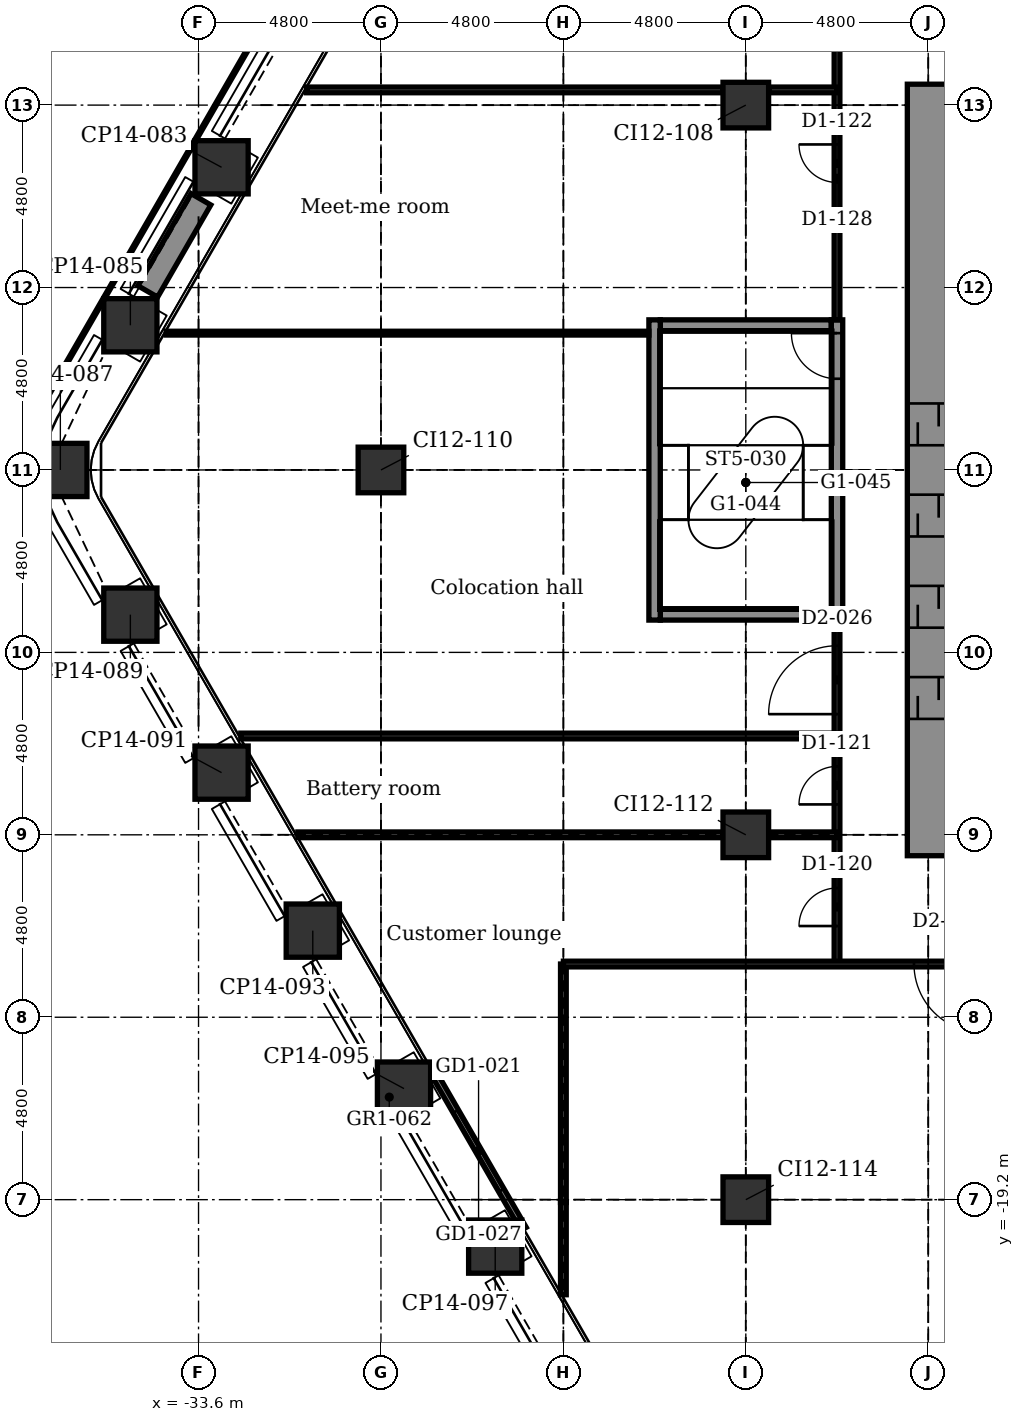
"""IFC4 building model, lengths in metres.
Left out: names, types, materials, properties, quantities, classifications, styles, units other than length and angle.
Written with IfcOpenShell. Run it as: python <this file> out.ifc"""

import sys

from ifc_helpers import new_model, si_unit, direction, frame, frame_2d, origin, origin_2d, place, context, subcontext, project, spatial, rectangle, extrude, element, fill, save


model = new_model("IFC4")
c1 = context("Model", 3, precision=1e-05, world=origin(), true_north=direction((0.0, 1.0)))
c2 = subcontext(c1, "Body", "Model", "MODEL_VIEW")
j1 = project(units=[si_unit("LENGTHUNIT", "METRE"), si_unit("PLANEANGLEUNIT", "RADIAN")], contexts=[c1])
p1 = place(None, origin())
s1 = spatial("IfcSite", under=j1, at=p1, CompositionType="ELEMENT")
p2 = place(p1, origin())
s2 = spatial("IfcBuilding", under=s1, at=p2, CompositionType="ELEMENT")
p3 = place(p2, frame((0.0, 0.0, 44.4)))
s3 = spatial("IfcBuildingStorey", under=s2, at=p3, CompositionType="ELEMENT", Elevation=44.4)
for number, where, z_axis, x_axis in (
    (1, (-25.794, -20.435, -0.25), (0.0, 0.0, 1.0), (0.866, 0.5, 0.0)),
    (2, (-28.194, -16.278, -0.25), (0.0, 0.0, 1.0), (0.866, 0.5, 0.0)),
    (3, (-30.594, -12.121, -0.25), (0.0, 0.0, 1.0), (0.866, 0.5, 0.0)),
    (4, (-32.994, -7.964, -0.25), (0.0, 0.0, 1.0), (0.866, 0.5, 0.0)),
    (5, (-35.394, -3.807, -0.25), (0.0, 0.0, 1.0), (0.866, 0.5, 0.0)),
    (6, (-37.236, 0.0, -0.25), (0.0, 0.0, 1.0), (1.0, 0.0, 0.0)),
    (7, (-35.394, 3.807, -0.25), (0.0, 0.0, 1.0), (0.5, 0.866, 0.0)),
    (8, (-32.994, 7.964, -0.25), (0.0, 0.0, 1.0), (0.5, 0.866, 0.0)),
):
    element("IfcColumn", number, at=place(p3, frame(where, z_axis=z_axis, x_axis=x_axis)), inside=s3, PredefinedType="COLUMN", context=c2, shape_type="SweptSolid", body=[
        extrude(rectangle(XDim=1.4, YDim=1.4, at=origin_2d()), origin(), (0.0, 0.0, 1.0), 5.5),
    ])
for number, where, z_axis, x_axis in (
    (9, (-28.8, 0.0, -0.25), (0.0, 0.0, 1.0), (1.0, 0.0, 0.0)),
    (10, (-19.2, -19.2, -0.25), (0.0, 0.0, 1.0), (1.0, 0.0, 0.0)),
    (11, (-19.2, -9.6, -0.25), (0.0, 0.0, 1.0), (1.0, 0.0, 0.0)),
    (12, (-19.2, 9.6, -0.25), (0.0, 0.0, 1.0), (1.0, 0.0, 0.0)),
):
    element("IfcColumn", number, at=place(p3, frame(where, z_axis=z_axis, x_axis=x_axis)), inside=s3, PredefinedType="COLUMN", context=c2, shape_type="SweptSolid", body=[
        extrude(rectangle(XDim=1.2, YDim=1.2, at=origin_2d()), origin(), (0.0, 0.0, 1.0), 5.5),
    ])
for number, where, z_axis, x_axis in (
    (13, (-21.45, -3.8, -0.25), (0.0, 0.0, 1.0), (1.0, 0.0, 0.0)),
    (14, (-21.45, 3.8, -0.25), (0.0, 0.0, 1.0), (1.0, 0.0, 0.0)),
):
    element("IfcWall", number, at=place(p3, frame(where, z_axis=z_axis, x_axis=x_axis)), inside=s3, PredefinedType="STANDARD", context=c2, shape_type="SweptSolid", body=[
        extrude(rectangle(XDim=4.5, YDim=0.3, at=frame_2d((2.25, 0.0))), origin(), (0.0, 0.0, 1.0), 5.5),
    ])
p4 = place(p3, frame((-21.6, -3.95, -0.25), z_axis=(0.0, 0.0, 1.0), x_axis=(0.0, 1.0, 0.0)))
e15 = element("IfcWall", 15, at=p4, inside=s3, PredefinedType="STANDARD", context=c2, shape_type="SweptSolid", body=[
    extrude(rectangle(XDim=7.9, YDim=0.3, at=frame_2d((3.95, 0.0))), origin(), (0.0, 0.0, 1.0), 5.5),
])
p5 = place(p3, frame((-16.8, -3.95, -0.25), z_axis=(0.0, 0.0, 1.0), x_axis=(0.0, 1.0, 0.0)))
e16 = element("IfcWall", 16, at=p5, inside=s3, PredefinedType="STANDARD", context=c2, shape_type="SweptSolid", body=[
    extrude(rectangle(XDim=7.9, YDim=0.3, at=frame_2d((3.95, 0.0))), origin(), (0.0, 0.0, 1.0), 5.5),
])
p6 = place(p5, frame((6.35, 0.0, 0.25)))
e17 = element("IfcOpeningElement", 17, at=p6, cuts=e16, PredefinedType="OPENING", context=c2, shape_type="SweptSolid", body=[
    extrude(rectangle(XDim=1.2, YDim=2.1, at=frame_2d((0.6, 1.05))), frame((0.0, 0.16, 0.0), z_axis=(0.0, -1.0, 0.0), x_axis=(1.0, 0.0, 0.0)), (0.0, 0.0, 1.0), 0.32),
])
p7 = place(p3, frame((-14.4, -10.15, -0.25), z_axis=(0.0, 0.0, 1.0), x_axis=(0.0, 1.0, 0.0)))
e18 = element("IfcWall", 18, at=p7, inside=s3, PredefinedType="SHEAR", context=c2, shape_type="SweptSolid", body=[
    extrude(rectangle(XDim=20.3, YDim=1.1, at=frame_2d((10.15, 0.0))), origin(), (0.0, 0.0, 1.0), 5.5),
])
p8 = place(p7, frame((3.6, 0.0, 0.25)))
e19 = element("IfcOpeningElement", 19, at=p8, cuts=e18, PredefinedType="OPENING", context=c2, shape_type="SweptSolid", body=[
    extrude(rectangle(XDim=1.1, YDim=2.1, at=frame_2d((0.55, 1.05))), frame((0.0, 0.56, 0.0), z_axis=(0.0, -1.0, 0.0), x_axis=(1.0, 0.0, 0.0)), (0.0, 0.0, 1.0), 1.12),
])
p9 = place(p7, frame((6.0, 0.0, 0.25)))
e20 = element("IfcOpeningElement", 20, at=p9, cuts=e18, PredefinedType="OPENING", context=c2, shape_type="SweptSolid", body=[
    extrude(rectangle(XDim=1.1, YDim=2.1, at=frame_2d((0.55, 1.05))), frame((0.0, 0.56, 0.0), z_axis=(0.0, -1.0, 0.0), x_axis=(1.0, 0.0, 0.0)), (0.0, 0.0, 1.0), 1.12),
])
p10 = place(p7, frame((8.4, 0.0, 0.25)))
e21 = element("IfcOpeningElement", 21, at=p10, cuts=e18, PredefinedType="OPENING", context=c2, shape_type="SweptSolid", body=[
    extrude(rectangle(XDim=1.1, YDim=2.1, at=frame_2d((0.55, 1.05))), frame((0.0, 0.56, 0.0), z_axis=(0.0, -1.0, 0.0), x_axis=(1.0, 0.0, 0.0)), (0.0, 0.0, 1.0), 1.12),
])
p11 = place(p7, frame((10.8, 0.0, 0.25)))
e22 = element("IfcOpeningElement", 22, at=p11, cuts=e18, PredefinedType="OPENING", context=c2, shape_type="SweptSolid", body=[
    extrude(rectangle(XDim=1.1, YDim=2.1, at=frame_2d((0.55, 1.05))), frame((0.0, 0.56, 0.0), z_axis=(0.0, -1.0, 0.0), x_axis=(1.0, 0.0, 0.0)), (0.0, 0.0, 1.0), 1.12),
])
p12 = place(p3, frame((-25.047, -19.969, 0.0), z_axis=(0.0, 0.0, 1.0), x_axis=(-0.5000167099, 0.866015756104, 0.0)))
e23 = element("IfcWall", 23, at=p12, inside=s3, PredefinedType="PARTITIONING", context=c2, shape_type="SweptSolid", body=[
    extrude(rectangle(XDim=4.74, YDim=0.16, at=frame_2d((2.37, 0.0))), origin(), (0.0, 0.0, 1.0), 5.25),
])
p13 = place(p12, frame((1.17, 0.0, 0.0)))
e24 = element("IfcOpeningElement", 24, at=p13, cuts=e23, PredefinedType="OPENING", context=c2, shape_type="SweptSolid", body=[
    extrude(rectangle(XDim=2.4, YDim=2.4, at=frame_2d((1.2, 1.2))), frame((0.0, 0.09, 0.0), z_axis=(0.0, -1.0, 0.0), x_axis=(1.0, 0.0, 0.0)), (0.0, 0.0, 1.0), 0.18),
])
p14 = place(p3, frame((-34.937, 4.698, 0.0), z_axis=(0.0, 0.0, 1.0), x_axis=(0.49998411664, 0.866034573852, 0.0)))
e25 = element("IfcWall", 25, at=p14, inside=s3, PredefinedType="USERDEFINED", context=c2, shape_type="SweptSolid", body=[
    extrude(rectangle(XDim=2.8, YDim=0.6, at=frame_2d((1.4, 0.0))), origin(), (0.0, 0.0, 1.0), 0.7),
])
p15 = place(p3, frame((-16.8, -13.0, 0.0), z_axis=(0.0, 0.0, 1.0), x_axis=(0.0, 1.0, 0.0)))
e26 = element("IfcWall", 26, at=p15, inside=s3, PredefinedType="PARTITIONING", context=c2, shape_type="SweptSolid", body=[
    extrude(rectangle(XDim=9.05, YDim=0.15, at=frame_2d((4.525, 0.0))), origin(), (0.0, 0.0, 1.0), 5.25),
])
p16 = place(p15, frame((1.0, 0.0, 0.0)))
e27 = element("IfcOpeningElement", 27, at=p16, cuts=e26, PredefinedType="OPENING", context=c2, shape_type="SweptSolid", body=[
    extrude(rectangle(XDim=1.0, YDim=2.1, at=frame_2d((0.5, 1.05))), frame((0.0, 0.085, 0.0), z_axis=(0.0, -1.0, 0.0), x_axis=(1.0, 0.0, 0.0)), (0.0, 0.0, 1.0), 0.17),
])
p17 = place(p15, frame((4.2, 0.0, 0.0)))
e28 = element("IfcOpeningElement", 28, at=p17, cuts=e26, PredefinedType="OPENING", context=c2, shape_type="SweptSolid", body=[
    extrude(rectangle(XDim=1.0, YDim=2.1, at=frame_2d((0.5, 1.05))), frame((0.0, 0.085, 0.0), z_axis=(0.0, -1.0, 0.0), x_axis=(1.0, 0.0, 0.0)), (0.0, 0.0, 1.0), 0.17),
])
p18 = place(p15, frame((6.575, 0.0, 0.0)))
e29 = element("IfcOpeningElement", 29, at=p18, cuts=e26, PredefinedType="OPENING", context=c2, shape_type="SweptSolid", body=[
    extrude(rectangle(XDim=1.8, YDim=2.1, at=frame_2d((0.9, 1.05))), frame((0.0, 0.085, 0.0), z_axis=(0.0, -1.0, 0.0), x_axis=(1.0, 0.0, 0.0)), (0.0, 0.0, 1.0), 0.17),
])
p19 = place(p3, frame((-16.8, 3.95, 0.0), z_axis=(0.0, 0.0, 1.0), x_axis=(0.0, 1.0, 0.0)))
e30 = element("IfcWall", 30, at=p19, inside=s3, PredefinedType="PARTITIONING", context=c2, shape_type="SweptSolid", body=[
    extrude(rectangle(XDim=9.35, YDim=0.15, at=frame_2d((4.675, 0.0))), origin(), (0.0, 0.0, 1.0), 5.25),
])
p20 = place(p19, frame((3.615, 0.0, 0.0)))
e31 = element("IfcOpeningElement", 31, at=p20, cuts=e30, PredefinedType="OPENING", context=c2, shape_type="SweptSolid", body=[
    extrude(rectangle(XDim=1.0, YDim=2.1, at=frame_2d((0.5, 1.05))), frame((0.0, 0.085, 0.0), z_axis=(0.0, -1.0, 0.0), x_axis=(1.0, 0.0, 0.0)), (0.0, 0.0, 1.0), 0.17),
])
p21 = place(p19, frame((7.2, 0.0, 0.0)))
e32 = element("IfcOpeningElement", 32, at=p21, cuts=e30, PredefinedType="OPENING", context=c2, shape_type="SweptSolid", body=[
    extrude(rectangle(XDim=1.0, YDim=2.1, at=frame_2d((0.5, 1.05))), frame((0.0, 0.085, 0.0), z_axis=(0.0, -1.0, 0.0), x_axis=(1.0, 0.0, 0.0)), (0.0, 0.0, 1.0), 0.17),
])
p22 = place(p3, frame((-24.0, -19.274, 0.0), z_axis=(0.0, 0.0, 1.0), x_axis=(0.0, 1.0, 0.0)))
e33 = element("IfcWall", 33, at=p22, inside=s3, PredefinedType="PARTITIONING", context=c2, shape_type="SweptSolid", body=[
    extrude(rectangle(XDim=6.274, YDim=0.15, at=frame_2d((3.137, 0.0))), origin(), (0.0, 0.0, 1.0), 4.717),
])
p23 = place(p3, frame((-24.0, -21.701, 0.0), z_axis=(0.0, 0.0, 1.0), x_axis=(0.0, 1.0, 0.0)))
e34 = element("IfcWall", 34, at=p23, inside=s3, PredefinedType="PARTITIONING", context=c2, shape_type="SweptSolid", body=[
    extrude(rectangle(XDim=2.427, YDim=0.15, at=frame_2d((1.214, 0.0))), origin(), (0.0, 0.0, 1.0), 4.94),
])
p24 = place(p3, frame((-24.0, -13.0, 0.0), z_axis=(0.0, 0.0, 1.0), x_axis=(1.0, 0.0, 0.0)))
e35 = element("IfcWall", 35, at=p24, inside=s3, PredefinedType="PARTITIONING", context=c2, shape_type="SweptSolid", body=[
    extrude(rectangle(XDim=40.8, YDim=0.15, at=frame_2d((20.4, 0.0))), origin(), (0.0, 0.0, 1.0), 5.25),
])
p25 = place(p24, frame((9.225, 0.0, 0.0)))
e36 = element("IfcOpeningElement", 36, at=p25, cuts=e35, PredefinedType="OPENING", context=c2, shape_type="SweptSolid", body=[
    extrude(rectangle(XDim=1.8, YDim=2.1, at=frame_2d((0.9, 1.05))), frame((0.0, 0.085, 0.0), z_axis=(0.0, -1.0, 0.0), x_axis=(1.0, 0.0, 0.0)), (0.0, 0.0, 1.0), 0.17),
])
p26 = place(p24, frame((12.7, 0.0, 0.0)))
e37 = element("IfcOpeningElement", 37, at=p26, cuts=e35, PredefinedType="OPENING", context=c2, shape_type="SweptSolid", body=[
    extrude(rectangle(XDim=1.0, YDim=2.1, at=frame_2d((0.5, 1.05))), frame((0.0, 0.085, 0.0), z_axis=(0.0, -1.0, 0.0), x_axis=(1.0, 0.0, 0.0)), (0.0, 0.0, 1.0), 0.17),
])
p27 = place(p24, frame((18.7, 0.0, 0.0)))
e38 = element("IfcOpeningElement", 38, at=p27, cuts=e35, PredefinedType="OPENING", context=c2, shape_type="SweptSolid", body=[
    extrude(rectangle(XDim=1.0, YDim=2.1, at=frame_2d((0.5, 1.05))), frame((0.0, 0.085, 0.0), z_axis=(0.0, -1.0, 0.0), x_axis=(1.0, 0.0, 0.0)), (0.0, 0.0, 1.0), 0.17),
])
p28 = place(p24, frame((29.625, 0.0, 0.0)))
e39 = element("IfcOpeningElement", 39, at=p28, cuts=e35, PredefinedType="OPENING", context=c2, shape_type="SweptSolid", body=[
    extrude(rectangle(XDim=1.8, YDim=2.1, at=frame_2d((0.9, 1.05))), frame((0.0, 0.085, 0.0), z_axis=(0.0, -1.0, 0.0), x_axis=(1.0, 0.0, 0.0)), (0.0, 0.0, 1.0), 0.17),
])
p29 = place(p24, frame((37.875, 0.0, 0.0)))
e40 = element("IfcOpeningElement", 40, at=p29, cuts=e35, PredefinedType="OPENING", context=c2, shape_type="SweptSolid", body=[
    extrude(rectangle(XDim=1.8, YDim=2.1, at=frame_2d((0.9, 1.05))), frame((0.0, 0.085, 0.0), z_axis=(0.0, -1.0, 0.0), x_axis=(1.0, 0.0, 0.0)), (0.0, 0.0, 1.0), 0.17),
])
p30 = place(p24, frame((15.4, 0.0, 0.9)))
e41 = element("IfcOpeningElement", 41, at=p30, cuts=e35, PredefinedType="OPENING", context=c2, shape_type="SweptSolid", body=[
    extrude(rectangle(XDim=1.8, YDim=1.5, at=frame_2d((0.9, 0.75))), frame((0.0, 0.085, 0.0), z_axis=(0.0, -1.0, 0.0), x_axis=(1.0, 0.0, 0.0)), (0.0, 0.0, 1.0), 0.17),
])
p31 = place(p3, frame((-30.987, -9.6, 0.0), z_axis=(0.0, 0.0, 1.0), x_axis=(1.0, 0.0, 0.0)))
e42 = element("IfcWall", 42, at=p31, inside=s3, PredefinedType="PARTITIONING", context=c2, shape_type="SweptSolid", body=[
    extrude(rectangle(XDim=11.187, YDim=0.15, at=frame_2d((5.593, 0.0))), origin(), (0.0, 0.0, 1.0), 4.488),
])
p32 = place(p3, frame((-18.6, -9.6, 0.0), z_axis=(0.0, 0.0, 1.0), x_axis=(1.0, 0.0, 0.0)))
e43 = element("IfcWall", 43, at=p32, inside=s3, PredefinedType="PARTITIONING", context=c2, shape_type="SweptSolid", body=[
    extrude(rectangle(XDim=1.8, YDim=0.15, at=frame_2d((0.9, 0.0))), origin(), (0.0, 0.0, 1.0), 4.642),
])
p33 = place(p3, frame((-32.488, -7.0, 0.0), z_axis=(0.0, 0.0, 1.0), x_axis=(1.0, 0.0, 0.0)))
e44 = element("IfcWall", 44, at=p33, inside=s3, PredefinedType="PARTITIONING", context=c2, shape_type="SweptSolid", body=[
    extrude(rectangle(XDim=15.688, YDim=0.15, at=frame_2d((7.844, 0.0))), origin(), (0.0, 0.0, 1.0), 5.25),
])
p34 = place(p3, frame((-34.451, 3.6, 0.0), z_axis=(0.0, 0.0, 1.0), x_axis=(1.0, 0.0, 0.0)))
e45 = element("IfcWall", 45, at=p34, inside=s3, PredefinedType="PARTITIONING", context=c2, shape_type="SweptSolid", body=[
    extrude(rectangle(XDim=12.701, YDim=0.1, at=frame_2d((6.351, 0.0))), origin(), (0.0, 0.0, 1.0), 5.25),
])
p35 = place(p3, frame((-30.756, 10.0, 0.0), z_axis=(0.0, 0.0, 1.0), x_axis=(1.0, 0.0, 0.0)))
e46 = element("IfcWall", 46, at=p35, inside=s3, PredefinedType="PARTITIONING", context=c2, shape_type="SweptSolid", body=[
    extrude(rectangle(XDim=10.956, YDim=0.15, at=frame_2d((5.478, 0.0))), origin(), (0.0, 0.0, 1.0), 5.25),
])
p36 = place(p3, frame((-18.6, 10.0, 0.0), z_axis=(0.0, 0.0, 1.0), x_axis=(1.0, 0.0, 0.0)))
e47 = element("IfcWall", 47, at=p36, inside=s3, PredefinedType="PARTITIONING", context=c2, shape_type="SweptSolid", body=[
    extrude(rectangle(XDim=1.8, YDim=0.15, at=frame_2d((0.9, 0.0))), origin(), (0.0, 0.0, 1.0), 5.25),
])
p37 = place(p13, origin())
e48 = element("IfcDoor", 48, at=p37, inside=s3, OperationType="DOUBLE_DOOR_SLIDING", PredefinedType="DOOR", context=c2, shape_type="SweptSolid", body=[
    extrude(rectangle(XDim=2.4, YDim=2.4, at=frame_2d((1.2, 1.2))), frame((0.0, 0.025, 0.0), z_axis=(0.0, -1.0, 0.0), x_axis=(1.0, 0.0, 0.0)), (0.0, 0.0, 1.0), 0.05),
])
fill(e24, e48)
p38 = place(p25, frame((1.8, 0.0, 0.0), z_axis=(0.0, 0.0, 1.0), x_axis=(-1.0, 0.0, 0.0)))
e49 = element("IfcDoor", 49, at=p38, inside=s3, OperationType="SINGLE_SWING_RIGHT", PredefinedType="DOOR", context=c2, shape_type="SweptSolid", body=[
    extrude(rectangle(XDim=1.8, YDim=2.1, at=frame_2d((0.9, 1.05))), frame((0.0, 0.025, 0.0), z_axis=(0.0, -1.0, 0.0), x_axis=(1.0, 0.0, 0.0)), (0.0, 0.0, 1.0), 0.05),
])
fill(e36, e49)
p39 = place(p16, origin())
e50 = element("IfcDoor", 50, at=p39, inside=s3, OperationType="SINGLE_SWING_LEFT", PredefinedType="DOOR", context=c2, shape_type="SweptSolid", body=[
    extrude(rectangle(XDim=1.0, YDim=2.1, at=frame_2d((0.5, 1.05))), frame((0.0, 0.025, 0.0), z_axis=(0.0, -1.0, 0.0), x_axis=(1.0, 0.0, 0.0)), (0.0, 0.0, 1.0), 0.05),
])
fill(e27, e50)
p40 = place(p17, origin())
e51 = element("IfcDoor", 51, at=p40, inside=s3, OperationType="SINGLE_SWING_LEFT", PredefinedType="DOOR", context=c2, shape_type="SweptSolid", body=[
    extrude(rectangle(XDim=1.0, YDim=2.1, at=frame_2d((0.5, 1.05))), frame((0.0, 0.025, 0.0), z_axis=(0.0, -1.0, 0.0), x_axis=(1.0, 0.0, 0.0)), (0.0, 0.0, 1.0), 0.05),
])
fill(e28, e51)
p41 = place(p18, origin())
e52 = element("IfcDoor", 52, at=p41, inside=s3, OperationType="SINGLE_SWING_LEFT", PredefinedType="DOOR", context=c2, shape_type="SweptSolid", body=[
    extrude(rectangle(XDim=1.8, YDim=2.1, at=frame_2d((0.9, 1.05))), frame((0.0, 0.025, 0.0), z_axis=(0.0, -1.0, 0.0), x_axis=(1.0, 0.0, 0.0)), (0.0, 0.0, 1.0), 0.05),
])
fill(e29, e52)
p42 = place(p20, origin())
e53 = element("IfcDoor", 53, at=p42, inside=s3, OperationType="SINGLE_SWING_RIGHT", PredefinedType="DOOR", context=c2, shape_type="SweptSolid", body=[
    extrude(rectangle(XDim=1.0, YDim=2.1, at=frame_2d((0.5, 1.05))), frame((0.0, 0.025, 0.0), z_axis=(0.0, -1.0, 0.0), x_axis=(1.0, 0.0, 0.0)), (0.0, 0.0, 1.0), 0.05),
])
fill(e31, e53)
p43 = place(p8, origin())
e54 = element("IfcDoor", 54, at=p43, inside=s3, OperationType="DOUBLE_DOOR_SLIDING", PredefinedType="DOOR", context=c2, shape_type="SweptSolid", body=[
    extrude(rectangle(XDim=1.1, YDim=2.1, at=frame_2d((0.55, 1.05))), frame((0.0, 0.025, 0.0), z_axis=(0.0, -1.0, 0.0), x_axis=(1.0, 0.0, 0.0)), (0.0, 0.0, 1.0), 0.05),
])
fill(e19, e54)
p44 = place(p9, origin())
e55 = element("IfcDoor", 55, at=p44, inside=s3, OperationType="DOUBLE_DOOR_SLIDING", PredefinedType="DOOR", context=c2, shape_type="SweptSolid", body=[
    extrude(rectangle(XDim=1.1, YDim=2.1, at=frame_2d((0.55, 1.05))), frame((0.0, 0.025, 0.0), z_axis=(0.0, -1.0, 0.0), x_axis=(1.0, 0.0, 0.0)), (0.0, 0.0, 1.0), 0.05),
])
fill(e20, e55)
p45 = place(p10, origin())
e56 = element("IfcDoor", 56, at=p45, inside=s3, OperationType="DOUBLE_DOOR_SLIDING", PredefinedType="DOOR", context=c2, shape_type="SweptSolid", body=[
    extrude(rectangle(XDim=1.1, YDim=2.1, at=frame_2d((0.55, 1.05))), frame((0.0, 0.025, 0.0), z_axis=(0.0, -1.0, 0.0), x_axis=(1.0, 0.0, 0.0)), (0.0, 0.0, 1.0), 0.05),
])
fill(e21, e56)
p46 = place(p11, origin())
e57 = element("IfcDoor", 57, at=p46, inside=s3, OperationType="DOUBLE_DOOR_SLIDING", PredefinedType="DOOR", context=c2, shape_type="SweptSolid", body=[
    extrude(rectangle(XDim=1.1, YDim=2.1, at=frame_2d((0.55, 1.05))), frame((0.0, 0.025, 0.0), z_axis=(0.0, -1.0, 0.0), x_axis=(1.0, 0.0, 0.0)), (0.0, 0.0, 1.0), 0.05),
])
fill(e22, e57)
p47 = place(p6, origin())
e58 = element("IfcDoor", 58, at=p47, inside=s3, OperationType="SINGLE_SWING_RIGHT", PredefinedType="DOOR", context=c2, shape_type="SweptSolid", body=[
    extrude(rectangle(XDim=1.2, YDim=2.1, at=frame_2d((0.6, 1.05))), frame((0.0, 0.025, 0.0), z_axis=(0.0, -1.0, 0.0), x_axis=(1.0, 0.0, 0.0)), (0.0, 0.0, 1.0), 0.05),
])
fill(e17, e58)
save(model, sys.argv[1])
